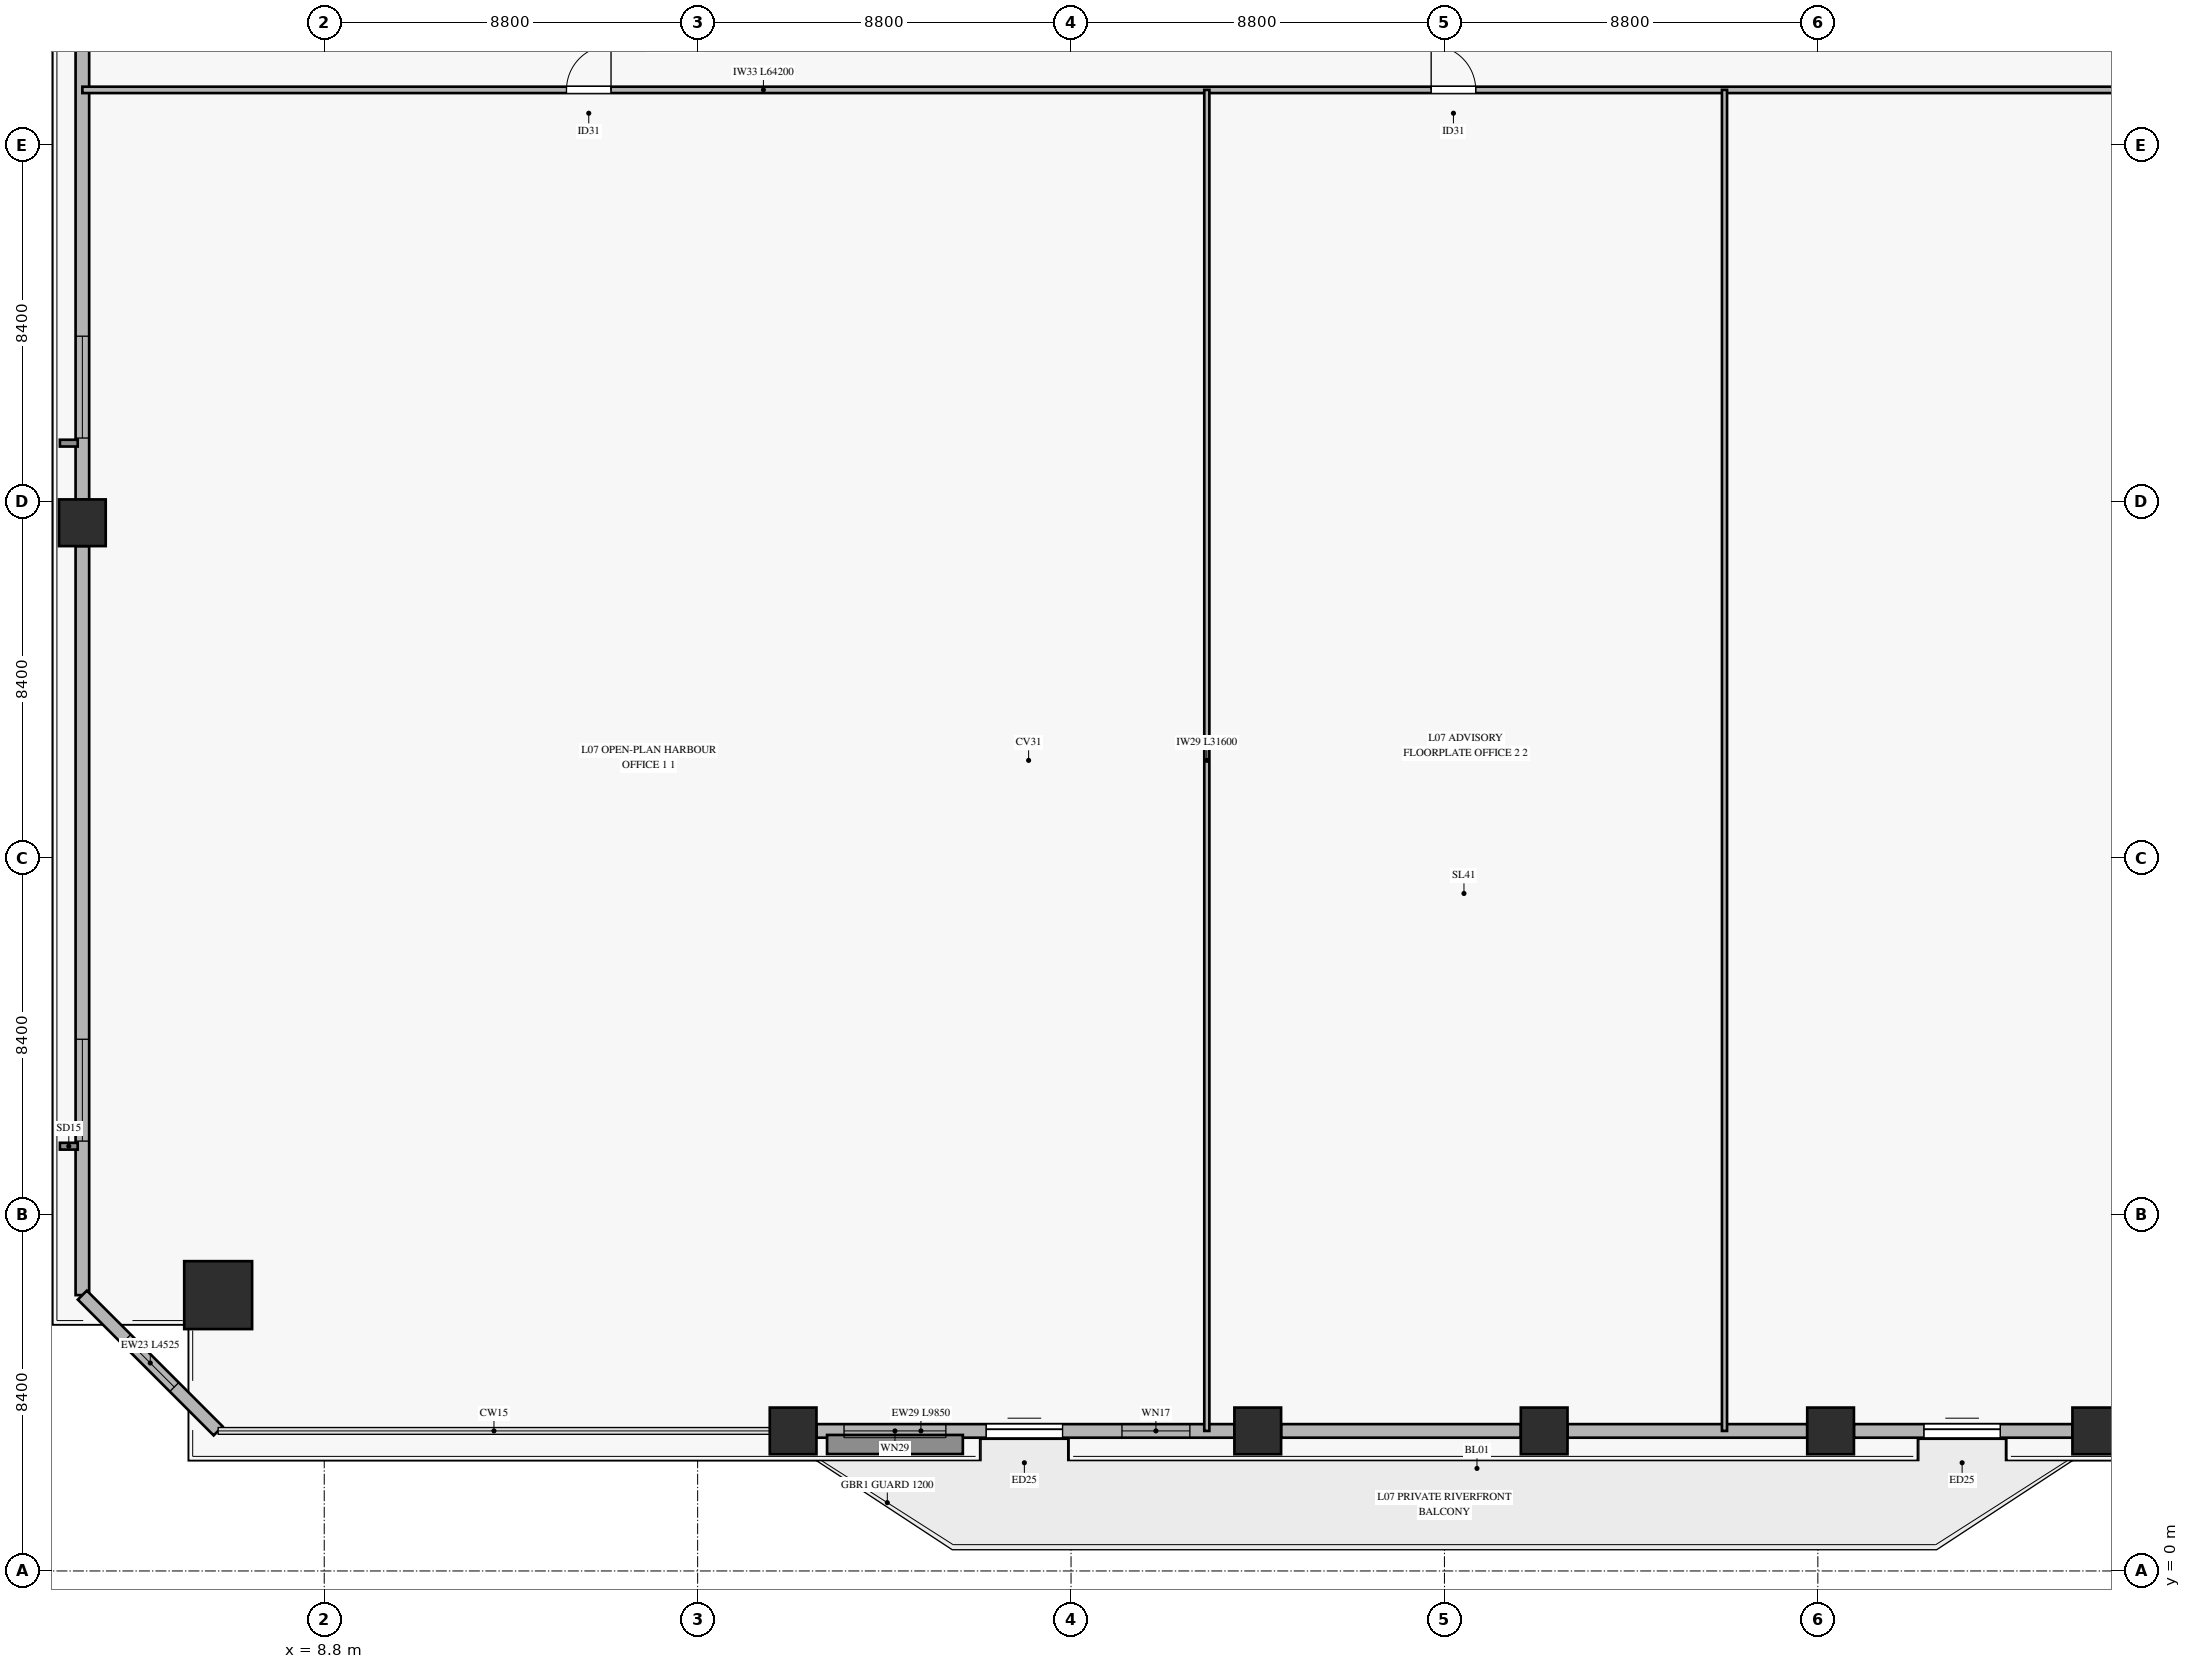
"""IFC4 building model, lengths in metres.
Left out: names, types, materials, properties, quantities, classifications, styles, units other than length and angle.
Written with IfcOpenShell. Run it as: python <this file> out.ifc"""

import sys

from ifc_helpers import new_model, si_unit, direction, frame, frame_2d, origin, origin_2d, place, context, subcontext, project, spatial, rectangle, hollow_rectangle, extrude, source, transform, mapped, element, fill, save


model = new_model("IFC4")
c1 = context("Model", 3, precision=1e-05, world=origin(), true_north=direction((0.0, 1.0)))
c2 = subcontext(c1, "Body", "Model", "MODEL_VIEW")
j1 = project(units=[si_unit("LENGTHUNIT", "METRE"), si_unit("PLANEANGLEUNIT", "RADIAN")], contexts=[c1])
p1 = place(None, origin())
s1 = spatial("IfcSite", under=j1, at=p1, CompositionType="ELEMENT")
p2 = place(p1, origin())
s2 = spatial("IfcBuilding", under=s1, at=p2, CompositionType="ELEMENT")
p3 = place(p2, frame((0.0, 0.0, 29.3)))
s3 = spatial("IfcBuildingStorey", under=s2, at=p3, CompositionType="ELEMENT", Elevation=29.3)
m1 = source(origin(), c2, "Body", "SweptSolid", [
    extrude(hollow_rectangle(XDim=1.6, YDim=1.6, WallThickness=0.075, at=origin_2d()), origin(), (0.0, 0.0, 1.0), 3.68),
])
p4 = place(p3, frame((6.3, 6.5, 0.0), z_axis=(0.0, 0.0, 1.0), x_axis=(1.0, 0.0, 0.0)))
e1 = element("IfcColumn", 1, at=p4, inside=s3, PredefinedType="COLUMN", context=c2, shape_type="MappedRepresentation", body=[
    mapped(m1, transform((0.0, 0.0, 0.0), x_axis=(1.0, 0.0, 0.0), y_axis=(0.0, 1.0, 0.0), z_axis=(0.0, 0.0, 1.0), scale=1.0)),
])
m2 = source(origin(), c2, "Body", "SweptSolid", [
    extrude(hollow_rectangle(XDim=1.1, YDim=1.1, WallThickness=0.05, at=origin_2d()), origin(), (0.0, 0.0, 1.0), 3.68),
])
for number, where, z_axis, x_axis in (
    (2, (19.85, 3.3, 0.0), (0.0, 0.0, 1.0), (1.0, 0.0, 0.0)),
    (3, (30.8, 3.3, 0.0), (0.0, 0.0, 1.0), (1.0, 0.0, 0.0)),
    (4, (37.55, 3.3, 0.0), (0.0, 0.0, 1.0), (1.0, 0.0, 0.0)),
    (5, (44.3, 3.3, 0.0), (0.0, 0.0, 1.0), (1.0, 0.0, 0.0)),
    (6, (50.55, 3.3, 0.0), (0.0, 0.0, 1.0), (1.0, 0.0, 0.0)),
    (7, (3.1, 24.7, 0.0), (0.0, 0.0, 1.0), (1.0, 0.0, 0.0)),
):
    element("IfcColumn", number, at=place(p3, frame(where, z_axis=z_axis, x_axis=x_axis)), inside=s3, PredefinedType="COLUMN", context=c2, shape_type="MappedRepresentation", body=[
        mapped(m2, transform((0.0, 0.0, 0.0), x_axis=(1.0, 0.0, 0.0), y_axis=(0.0, 1.0, 0.0), z_axis=(0.0, 0.0, 1.0), scale=1.0)),
    ])
p5 = place(p3, frame((20.4, 3.3, 0.0), z_axis=(0.0, 0.0, 1.0), x_axis=(1.0, 0.0, 0.0)))
e8 = element("IfcWall", 8, at=p5, inside=s3, PredefinedType="SOLIDWALL", context=c2, shape_type="SweptSolid", body=[
    extrude(rectangle(XDim=9.85, YDim=0.32, at=frame_2d((4.925, 0.0))), origin(), (0.0, 0.0, 1.0), 3.16),
])
p6 = place(p5, frame((4.0, 0.0, 0.0)))
e9 = element("IfcOpeningElement", 9, at=p6, cuts=e8, PredefinedType="OPENING", context=c2, shape_type="SweptSolid", body=[
    extrude(rectangle(XDim=1.8, YDim=2.25, at=frame_2d((0.9, 1.125))), frame((0.0, 0.17, 0.0), z_axis=(0.0, -1.0, 0.0), x_axis=(1.0, 0.0, 0.0)), (0.0, 0.0, 1.0), 0.34),
])
p7 = place(p5, frame((0.65, 0.0, 0.45)))
e10 = element("IfcOpeningElement", 10, at=p7, cuts=e8, PredefinedType="OPENING", context=c2, shape_type="SweptSolid", body=[
    extrude(rectangle(XDim=2.4, YDim=2.1, at=frame_2d((1.2, 1.05))), frame((0.0, 0.17, 0.0), z_axis=(0.0, -1.0, 0.0), x_axis=(1.0, 0.0, 0.0)), (0.0, 0.0, 1.0), 0.34),
])
p8 = place(p5, frame((7.2, 0.0, 0.45)))
e11 = element("IfcOpeningElement", 11, at=p8, cuts=e8, PredefinedType="OPENING", context=c2, shape_type="SweptSolid", body=[
    extrude(rectangle(XDim=1.6, YDim=2.0, at=frame_2d((0.8, 1.0))), frame((0.0, 0.17, 0.0), z_axis=(0.0, -1.0, 0.0), x_axis=(1.0, 0.0, 0.0)), (0.0, 0.0, 1.0), 0.34),
])
for number, where, z_axis, x_axis in (
    (12, (31.35, 3.3, 0.0), (0.0, 0.0, 1.0), (1.0, 0.0, 0.0)),
    (13, (38.1, 3.3, 0.0), (0.0, 0.0, 1.0), (1.0, 0.0, 0.0)),
):
    element("IfcWall", number, at=place(p3, frame(where, z_axis=z_axis, x_axis=x_axis)), inside=s3, PredefinedType="SOLIDWALL", context=c2, shape_type="SweptSolid", body=[
        extrude(rectangle(XDim=5.65, YDim=0.32, at=frame_2d((2.825, 0.0))), origin(), (0.0, 0.0, 1.0), 3.16),
    ])
p9 = place(p3, frame((44.85, 3.3, 0.0), z_axis=(0.0, 0.0, 1.0), x_axis=(1.0, 0.0, 0.0)))
e14 = element("IfcWall", 14, at=p9, inside=s3, PredefinedType="SOLIDWALL", context=c2, shape_type="SweptSolid", body=[
    extrude(rectangle(XDim=5.15, YDim=0.32, at=frame_2d((2.575, 0.0))), origin(), (0.0, 0.0, 1.0), 3.16),
])
p10 = place(p9, frame((1.65, 0.0, 0.0)))
e15 = element("IfcOpeningElement", 15, at=p10, cuts=e14, PredefinedType="OPENING", context=c2, shape_type="SweptSolid", body=[
    extrude(rectangle(XDim=1.8, YDim=2.25, at=frame_2d((0.9, 1.125))), frame((0.0, 0.17, 0.0), z_axis=(0.0, -1.0, 0.0), x_axis=(1.0, 0.0, 0.0)), (0.0, 0.0, 1.0), 0.34),
])
p11 = place(p3, frame((3.1, 6.5, 0.0), z_axis=(0.0, 0.0, 1.0), x_axis=(0.0, 1.0, 0.0)))
e16 = element("IfcWall", 16, at=p11, inside=s3, PredefinedType="SOLIDWALL", context=c2, shape_type="SweptSolid", body=[
    extrude(rectangle(XDim=17.65, YDim=0.32, at=frame_2d((8.825, 0.0))), origin(), (0.0, 0.0, 1.0), 3.16),
])
p12 = place(p11, frame((3.629, 0.0, 0.45)))
e17 = element("IfcOpeningElement", 17, at=p12, cuts=e16, PredefinedType="OPENING", context=c2, shape_type="SweptSolid", body=[
    extrude(rectangle(XDim=2.4, YDim=2.1, at=frame_2d((1.2, 1.05))), frame((0.0, 0.17, 0.0), z_axis=(0.0, -1.0, 0.0), x_axis=(1.0, 0.0, 0.0)), (0.0, 0.0, 1.0), 0.34),
])
p13 = place(p3, frame((3.1, 25.25, 0.0), z_axis=(0.0, 0.0, 1.0), x_axis=(0.0, 1.0, 0.0)))
e18 = element("IfcWall", 18, at=p13, inside=s3, PredefinedType="SOLIDWALL", context=c2, shape_type="SweptSolid", body=[
    extrude(rectangle(XDim=17.65, YDim=0.32, at=frame_2d((8.825, 0.0))), origin(), (0.0, 0.0, 1.0), 3.16),
])
p14 = place(p13, frame((1.446, 0.0, 0.45)))
e19 = element("IfcOpeningElement", 19, at=p14, cuts=e18, PredefinedType="OPENING", context=c2, shape_type="SweptSolid", body=[
    extrude(rectangle(XDim=2.4, YDim=2.1, at=frame_2d((1.2, 1.05))), frame((0.0, 0.17, 0.0), z_axis=(0.0, -1.0, 0.0), x_axis=(1.0, 0.0, 0.0)), (0.0, 0.0, 1.0), 0.34),
])
p15 = place(p13, frame((13.66, 0.0, 0.45)))
e20 = element("IfcOpeningElement", 20, at=p15, cuts=e18, PredefinedType="OPENING", context=c2, shape_type="SweptSolid", body=[
    extrude(rectangle(XDim=2.4, YDim=2.1, at=frame_2d((1.2, 1.05))), frame((0.0, 0.17, 0.0), z_axis=(0.0, -1.0, 0.0), x_axis=(1.0, 0.0, 0.0)), (0.0, 0.0, 1.0), 0.34),
])
p16 = place(p3, frame((3.1, 6.5, 0.0), z_axis=(0.0, 0.0, 1.0), x_axis=(0.707106781187, -0.707106781187, 0.0)))
e21 = element("IfcWall", 21, at=p16, inside=s3, PredefinedType="SOLIDWALL", context=c2, shape_type="SweptSolid", body=[
    extrude(rectangle(XDim=4.525, YDim=0.3, at=frame_2d((2.263, 0.0))), origin(), (0.0, 0.0, 1.0), 3.16),
])
p17 = place(p16, frame((1.463, 0.0, 0.45)))
e22 = element("IfcOpeningElement", 22, at=p17, cuts=e21, PredefinedType="OPENING", context=c2, shape_type="SweptSolid", body=[
    extrude(rectangle(XDim=1.6, YDim=2.0, at=frame_2d((0.8, 1.0))), frame((0.0, 0.16, 0.0), z_axis=(0.0, -1.0, 0.0), x_axis=(1.0, 0.0, 0.0)), (0.0, 0.0, 1.0), 0.32),
])
p18 = place(p3, frame((3.1, 34.9, 0.0), z_axis=(0.0, 0.0, 1.0), x_axis=(1.0, 0.0, 0.0)))
e23 = element("IfcWall", 23, at=p18, inside=s3, PredefinedType="PARTITIONING", context=c2, shape_type="SweptSolid", body=[
    extrude(rectangle(XDim=64.2, YDim=0.15, at=frame_2d((32.1, 0.0))), origin(), (0.0, 0.0, 1.0), 2.765),
])
p19 = place(p18, frame((11.409, 0.0, 0.0)))
e24 = element("IfcOpeningElement", 24, at=p19, cuts=e23, PredefinedType="OPENING", context=c2, shape_type="SweptSolid", body=[
    extrude(rectangle(XDim=1.05, YDim=2.15, at=frame_2d((0.525, 1.075))), frame((0.0, 0.085, 0.0), z_axis=(0.0, -1.0, 0.0), x_axis=(1.0, 0.0, 0.0)), (0.0, 0.0, 1.0), 0.17),
])
p20 = place(p18, frame((31.787, 0.0, 0.0)))
e25 = element("IfcOpeningElement", 25, at=p20, cuts=e23, PredefinedType="OPENING", context=c2, shape_type="SweptSolid", body=[
    extrude(rectangle(XDim=1.05, YDim=2.15, at=frame_2d((0.525, 1.075))), frame((0.0, 0.085, 0.0), z_axis=(0.0, -1.0, 0.0), x_axis=(1.0, 0.0, 0.0)), (0.0, 0.0, 1.0), 0.17),
])
p21 = place(p18, frame((49.489, 0.0, 0.0)))
e26 = element("IfcOpeningElement", 26, at=p21, cuts=e23, PredefinedType="OPENING", context=c2, shape_type="SweptSolid", body=[
    extrude(rectangle(XDim=1.05, YDim=2.15, at=frame_2d((0.525, 1.075))), frame((0.0, 0.085, 0.0), z_axis=(0.0, -1.0, 0.0), x_axis=(1.0, 0.0, 0.0)), (0.0, 0.0, 1.0), 0.17),
])
for number, where, z_axis, x_axis in (
    (27, (29.6, 3.3, 0.0), (0.0, 0.0, 1.0), (0.0, 1.0, 0.0)),
    (28, (41.8, 3.3, 0.0), (0.0, 0.0, 1.0), (0.0, 1.0, 0.0)),
):
    element("IfcWall", number, at=place(p3, frame(where, z_axis=z_axis, x_axis=x_axis)), inside=s3, PredefinedType="PARTITIONING", context=c2, shape_type="SweptSolid", body=[
        extrude(rectangle(XDim=31.6, YDim=0.12, at=frame_2d((15.8, 0.0))), origin(), (0.0, 0.0, 1.0), 3.165),
    ])
m3 = source(origin(), c2, "Body", "SweptSolid", [
    extrude(rectangle(XDim=1.8, YDim=2.25, at=frame_2d((0.9, 1.125))), frame((0.0, 0.025, 0.0), z_axis=(0.0, -1.0, 0.0), x_axis=(1.0, 0.0, 0.0)), (0.0, 0.0, 1.0), 0.05),
])
p22 = place(p6, origin())
e29 = element("IfcDoor", 29, at=p22, inside=s3, OperationType="SLIDING_TO_LEFT", PredefinedType="DOOR", context=c2, shape_type="MappedRepresentation", body=[
    mapped(m3, transform((0.0, 0.0, 0.0), x_axis=(1.0, 0.0, 0.0), y_axis=(0.0, 1.0, 0.0), z_axis=(0.0, 0.0, 1.0), scale=1.0)),
])
fill(e9, e29)
m4 = source(origin(), c2, "Body", "SweptSolid", [
    extrude(rectangle(XDim=2.4, YDim=2.1, at=frame_2d((1.2, 1.05))), frame((0.0, 0.03, 0.0), z_axis=(0.0, -1.0, 0.0), x_axis=(1.0, 0.0, 0.0)), (0.0, 0.0, 1.0), 0.06),
])
p23 = place(p7, origin())
e30 = element("IfcWindow", 30, at=p23, inside=s3, PartitioningType="SINGLE_PANEL", PredefinedType="WINDOW", context=c2, shape_type="MappedRepresentation", body=[
    mapped(m4, transform((0.0, 0.0, 0.0), x_axis=(1.0, 0.0, 0.0), y_axis=(0.0, 1.0, 0.0), z_axis=(0.0, 0.0, 1.0), scale=1.0)),
])
fill(e10, e30)
m5 = source(origin(), c2, "Body", "SweptSolid", [
    extrude(rectangle(XDim=1.6, YDim=2.0, at=frame_2d((0.8, 1.0))), frame((0.0, 0.03, 0.0), z_axis=(0.0, -1.0, 0.0), x_axis=(1.0, 0.0, 0.0)), (0.0, 0.0, 1.0), 0.06),
])
p24 = place(p8, origin())
e31 = element("IfcWindow", 31, at=p24, inside=s3, PartitioningType="SINGLE_PANEL", PredefinedType="WINDOW", context=c2, shape_type="MappedRepresentation", body=[
    mapped(m5, transform((0.0, 0.0, 0.0), x_axis=(1.0, 0.0, 0.0), y_axis=(0.0, 1.0, 0.0), z_axis=(0.0, 0.0, 1.0), scale=1.0)),
])
fill(e11, e31)
p25 = place(p10, origin())
e32 = element("IfcDoor", 32, at=p25, inside=s3, OperationType="SLIDING_TO_LEFT", PredefinedType="DOOR", context=c2, shape_type="MappedRepresentation", body=[
    mapped(m3, transform((0.0, 0.0, 0.0), x_axis=(1.0, 0.0, 0.0), y_axis=(0.0, 1.0, 0.0), z_axis=(0.0, 0.0, 1.0), scale=1.0)),
])
fill(e15, e32)
p26 = place(p12, origin())
e33 = element("IfcWindow", 33, at=p26, inside=s3, PartitioningType="SINGLE_PANEL", PredefinedType="WINDOW", context=c2, shape_type="MappedRepresentation", body=[
    mapped(m4, transform((0.0, 0.0, 0.0), x_axis=(1.0, 0.0, 0.0), y_axis=(0.0, 1.0, 0.0), z_axis=(0.0, 0.0, 1.0), scale=1.0)),
])
fill(e17, e33)
p27 = place(p14, origin())
e34 = element("IfcWindow", 34, at=p27, inside=s3, PartitioningType="SINGLE_PANEL", PredefinedType="WINDOW", context=c2, shape_type="MappedRepresentation", body=[
    mapped(m4, transform((0.0, 0.0, 0.0), x_axis=(1.0, 0.0, 0.0), y_axis=(0.0, 1.0, 0.0), z_axis=(0.0, 0.0, 1.0), scale=1.0)),
])
fill(e19, e34)
p28 = place(p17, origin())
e35 = element("IfcWindow", 35, at=p28, inside=s3, PartitioningType="SINGLE_PANEL", PredefinedType="WINDOW", context=c2, shape_type="MappedRepresentation", body=[
    mapped(m5, transform((0.0, 0.0, 0.0), x_axis=(1.0, 0.0, 0.0), y_axis=(0.0, 1.0, 0.0), z_axis=(0.0, 0.0, 1.0), scale=1.0)),
])
fill(e22, e35)
m6 = source(origin(), c2, "Body", "SweptSolid", [
    extrude(rectangle(XDim=1.05, YDim=2.15, at=frame_2d((0.525, 1.075))), frame((0.0, 0.025, 0.0), z_axis=(0.0, -1.0, 0.0), x_axis=(1.0, 0.0, 0.0)), (0.0, 0.0, 1.0), 0.05),
])
p29 = place(p19, origin())
e36 = element("IfcDoor", 36, at=p29, inside=s3, OperationType="SINGLE_SWING_RIGHT", PredefinedType="DOOR", context=c2, shape_type="MappedRepresentation", body=[
    mapped(m6, transform((0.0, 0.0, 0.0), x_axis=(1.0, 0.0, 0.0), y_axis=(0.0, 1.0, 0.0), z_axis=(0.0, 0.0, 1.0), scale=1.0)),
])
fill(e24, e36)
p30 = place(p20, origin())
e37 = element("IfcDoor", 37, at=p30, inside=s3, OperationType="SINGLE_SWING_LEFT", PredefinedType="DOOR", context=c2, shape_type="MappedRepresentation", body=[
    mapped(m6, transform((0.0, 0.0, 0.0), x_axis=(1.0, 0.0, 0.0), y_axis=(0.0, 1.0, 0.0), z_axis=(0.0, 0.0, 1.0), scale=1.0)),
])
fill(e25, e37)
save(model, sys.argv[1])
